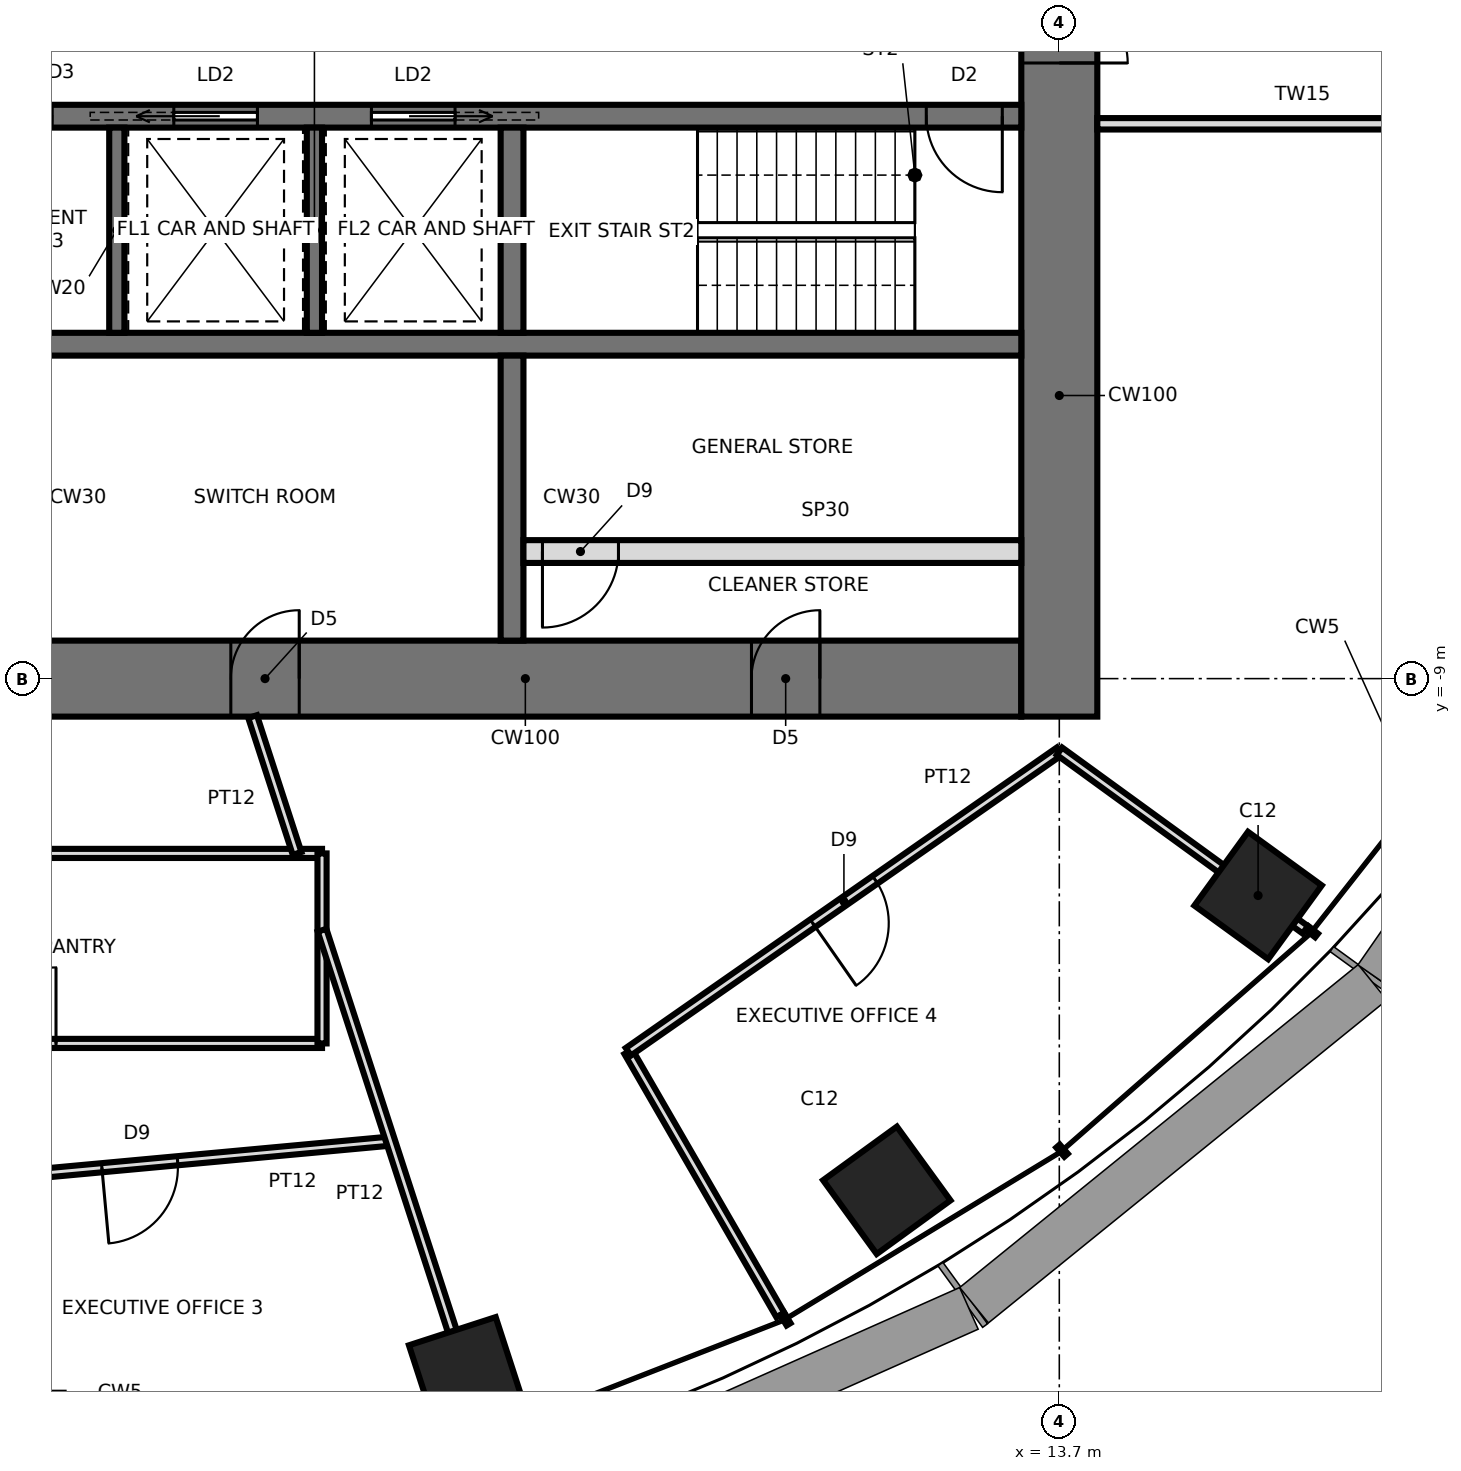
"""IFC4 building model, lengths in metres.
Left out: names, types, materials, properties, quantities, classifications, styles, units other than length and angle.
Written with IfcOpenShell. Run it as: python <this file> out.ifc"""

import sys

from ifc_helpers import new_model, si_unit, direction, frame, frame_2d, origin, origin_2d, place, context, subcontext, project, spatial, rectangle, extrude, element, fill, save


model = new_model("IFC4")
c1 = context("Model", 3, precision=1e-05, world=origin(), true_north=direction((0.0, 1.0)))
c2 = subcontext(c1, "Body", "Model", "MODEL_VIEW")
j1 = project(units=[si_unit("LENGTHUNIT", "METRE"), si_unit("PLANEANGLEUNIT", "RADIAN")], contexts=[c1])
p1 = place(None, origin())
s1 = spatial("IfcSite", under=j1, at=p1, CompositionType="ELEMENT")
p2 = place(p1, origin())
s2 = spatial("IfcBuilding", under=s1, at=p2, CompositionType="ELEMENT")
p3 = place(p2, frame((0.0, 0.0, 256.0)))
s3 = spatial("IfcBuildingStorey", under=s2, at=p3, CompositionType="ELEMENT", Elevation=256.0)
for number, where, z_axis, x_axis in (
    (1, (5.9, -18.157, 0.0), (0.0, 0.0, 1.0), (0.309, -0.951, 0.0)),
    (2, (11.43, -15.733, 0.0), (0.0, 0.0, 1.0), (0.588, -0.809, 0.0)),
    (3, (16.315, -11.854, 0.0), (0.0, 0.0, 1.0), (0.809, -0.588, 0.0)),
):
    element("IfcColumn", number, at=place(p3, frame(where, z_axis=z_axis, x_axis=x_axis)), inside=s3, PredefinedType="COLUMN", context=c2, shape_type="SweptSolid", body=[
        extrude(rectangle(XDim=1.2, YDim=1.2, at=origin_2d()), origin(), (0.0, 0.0, 1.0), 4.2),
    ])
p4 = place(p3, frame((-13.2, -9.0, 0.0), z_axis=(0.0, 0.0, 1.0), x_axis=(1.0, 0.0, 0.0)))
e4 = element("IfcWall", 4, at=p4, inside=s3, PredefinedType="SHEAR", context=c2, shape_type="SweptSolid", body=[
    extrude(rectangle(XDim=26.4, YDim=1.0, at=frame_2d((13.2, 0.0))), origin(), (0.0, 0.0, 1.0), 4.2),
])
p5 = place(p4, frame((2.65, 0.0, 0.0)))
e5 = element("IfcOpeningElement", 5, at=p5, cuts=e4, PredefinedType="OPENING", context=c2, shape_type="SweptSolid", body=[
    extrude(rectangle(XDim=0.9, YDim=2.1, at=frame_2d((0.45, 1.05))), frame((0.0, 0.51, 0.0), z_axis=(0.0, -1.0, 0.0), x_axis=(1.0, 0.0, 0.0)), (0.0, 0.0, 1.0), 1.02),
])
p6 = place(p4, frame((9.5, 0.0, 0.0)))
e6 = element("IfcOpeningElement", 6, at=p6, cuts=e4, PredefinedType="OPENING", context=c2, shape_type="SweptSolid", body=[
    extrude(rectangle(XDim=0.9, YDim=2.1, at=frame_2d((0.45, 1.05))), frame((0.0, 0.51, 0.0), z_axis=(0.0, -1.0, 0.0), x_axis=(1.0, 0.0, 0.0)), (0.0, 0.0, 1.0), 1.02),
])
p7 = place(p4, frame((16.0, 0.0, 0.0)))
e7 = element("IfcOpeningElement", 7, at=p7, cuts=e4, PredefinedType="OPENING", context=c2, shape_type="SweptSolid", body=[
    extrude(rectangle(XDim=0.9, YDim=2.1, at=frame_2d((0.45, 1.05))), frame((0.0, 0.51, 0.0), z_axis=(0.0, -1.0, 0.0), x_axis=(1.0, 0.0, 0.0)), (0.0, 0.0, 1.0), 1.02),
])
p8 = place(p4, frame((22.85, 0.0, 0.0)))
e8 = element("IfcOpeningElement", 8, at=p8, cuts=e4, PredefinedType="OPENING", context=c2, shape_type="SweptSolid", body=[
    extrude(rectangle(XDim=0.9, YDim=2.1, at=frame_2d((0.45, 1.05))), frame((0.0, 0.51, 0.0), z_axis=(0.0, -1.0, 0.0), x_axis=(1.0, 0.0, 0.0)), (0.0, 0.0, 1.0), 1.02),
])
p9 = place(p3, frame((13.7, -9.5, 0.0), z_axis=(0.0, 0.0, 1.0), x_axis=(0.0, 1.0, 0.0)))
e9 = element("IfcWall", 9, at=p9, inside=s3, PredefinedType="SHEAR", context=c2, shape_type="SweptSolid", body=[
    extrude(rectangle(XDim=19.0, YDim=1.0, at=frame_2d((9.5, 0.0))), origin(), (0.0, 0.0, 1.0), 4.2),
])
p10 = place(p9, frame((8.6, 0.0, 0.0)))
e10 = element("IfcOpeningElement", 10, at=p10, cuts=e9, PredefinedType="OPENING", context=c2, shape_type="SweptSolid", body=[
    extrude(rectangle(XDim=1.8, YDim=2.4, at=frame_2d((0.9, 1.2))), frame((0.0, 0.51, 0.0), z_axis=(0.0, -1.0, 0.0), x_axis=(1.0, 0.0, 0.0)), (0.0, 0.0, 1.0), 1.02),
])
p11 = place(p3, frame((-13.2, -1.6, 0.0), z_axis=(0.0, 0.0, 1.0), x_axis=(1.0, 0.0, 0.0)))
e11 = element("IfcWall", 11, at=p11, inside=s3, PredefinedType="SHEAR", context=c2, shape_type="SweptSolid", body=[
    extrude(rectangle(XDim=26.4, YDim=0.3, at=frame_2d((13.2, 0.0))), origin(), (0.0, 0.0, 1.0), 4.2),
])
p12 = place(p11, frame((25.15, 0.0, 0.0)))
e12 = element("IfcOpeningElement", 12, at=p12, cuts=e11, PredefinedType="OPENING", context=c2, shape_type="SweptSolid", body=[
    extrude(rectangle(XDim=1.0, YDim=2.1, at=frame_2d((0.5, 1.05))), frame((0.0, 0.16, 0.0), z_axis=(0.0, -1.0, 0.0), x_axis=(1.0, 0.0, 0.0)), (0.0, 0.0, 1.0), 0.32),
])
p13 = place(p11, frame((7.55, 0.0, 0.0)))
e13 = element("IfcOpeningElement", 13, at=p13, cuts=e11, PredefinedType="OPENING", context=c2, shape_type="SweptSolid", body=[
    extrude(rectangle(XDim=0.9, YDim=2.1, at=frame_2d((0.45, 1.05))), frame((0.0, 0.16, 0.0), z_axis=(0.0, -1.0, 0.0), x_axis=(1.0, 0.0, 0.0)), (0.0, 0.0, 1.0), 0.32),
])
p14 = place(p11, frame((10.15, 0.0, 0.0)))
e14 = element("IfcOpeningElement", 14, at=p14, cuts=e11, PredefinedType="OPENING", context=c2, shape_type="SweptSolid", body=[
    extrude(rectangle(XDim=0.9, YDim=2.1, at=frame_2d((0.45, 1.05))), frame((0.0, 0.16, 0.0), z_axis=(0.0, -1.0, 0.0), x_axis=(1.0, 0.0, 0.0)), (0.0, 0.0, 1.0), 0.32),
])
p15 = place(p11, frame((12.75, 0.0, 0.0)))
e15 = element("IfcOpeningElement", 15, at=p15, cuts=e11, PredefinedType="OPENING", context=c2, shape_type="SweptSolid", body=[
    extrude(rectangle(XDim=0.9, YDim=2.1, at=frame_2d((0.45, 1.05))), frame((0.0, 0.16, 0.0), z_axis=(0.0, -1.0, 0.0), x_axis=(1.0, 0.0, 0.0)), (0.0, 0.0, 1.0), 0.32),
])
p16 = place(p11, frame((15.25, 0.0, 0.0)))
e16 = element("IfcOpeningElement", 16, at=p16, cuts=e11, PredefinedType="OPENING", context=c2, shape_type="SweptSolid", body=[
    extrude(rectangle(XDim=1.1, YDim=2.3, at=frame_2d((0.55, 1.15))), frame((0.0, 0.16, 0.0), z_axis=(0.0, -1.0, 0.0), x_axis=(1.0, 0.0, 0.0)), (0.0, 0.0, 1.0), 0.32),
])
p17 = place(p11, frame((17.85, 0.0, 0.0)))
e17 = element("IfcOpeningElement", 17, at=p17, cuts=e11, PredefinedType="OPENING", context=c2, shape_type="SweptSolid", body=[
    extrude(rectangle(XDim=1.1, YDim=2.3, at=frame_2d((0.55, 1.15))), frame((0.0, 0.16, 0.0), z_axis=(0.0, -1.0, 0.0), x_axis=(1.0, 0.0, 0.0)), (0.0, 0.0, 1.0), 0.32),
])
p18 = place(p11, frame((5.55, 0.0, 0.0)))
e18 = element("IfcOpeningElement", 18, at=p18, cuts=e11, PredefinedType="OPENING", context=c2, shape_type="SweptSolid", body=[
    extrude(rectangle(XDim=0.9, YDim=2.1, at=frame_2d((0.45, 1.05))), frame((0.0, 0.16, 0.0), z_axis=(0.0, -1.0, 0.0), x_axis=(1.0, 0.0, 0.0)), (0.0, 0.0, 1.0), 0.32),
])
p19 = place(p3, frame((-13.2, -4.6, 0.0), z_axis=(0.0, 0.0, 1.0), x_axis=(1.0, 0.0, 0.0)))
e19 = element("IfcWall", 19, at=p19, inside=s3, PredefinedType="SHEAR", context=c2, shape_type="SweptSolid", body=[
    extrude(rectangle(XDim=26.4, YDim=0.3, at=frame_2d((13.2, 0.0))), origin(), (0.0, 0.0, 1.0), 4.2),
])
p20 = place(p3, frame((6.5, -1.75, 0.0), z_axis=(0.0, 0.0, 1.0), x_axis=(0.0, -1.0, 0.0)))
e20 = element("IfcWall", 20, at=p20, inside=s3, PredefinedType="SHEAR", context=c2, shape_type="SweptSolid", body=[
    extrude(rectangle(XDim=2.7, YDim=0.3, at=frame_2d((1.35, 0.0))), origin(), (0.0, 0.0, 1.0), 4.2),
])
p21 = place(p3, frame((6.5, -4.75, 0.0), z_axis=(0.0, 0.0, 1.0), x_axis=(0.0, -1.0, 0.0)))
e21 = element("IfcWall", 21, at=p21, inside=s3, PredefinedType="SHEAR", context=c2, shape_type="SweptSolid", body=[
    extrude(rectangle(XDim=3.75, YDim=0.3, at=frame_2d((1.875, 0.0))), origin(), (0.0, 0.0, 1.0), 4.2),
])
for number, where, z_axis, x_axis in (
    (22, (1.3, -1.75, 0.0), (0.0, 0.0, 1.0), (0.0, -1.0, 0.0)),
    (23, (3.9, -1.75, 0.0), (0.0, 0.0, 1.0), (0.0, -1.0, 0.0)),
):
    element("IfcWall", number, at=place(p3, frame(where, z_axis=z_axis, x_axis=x_axis)), inside=s3, PredefinedType="SHEAR", context=c2, shape_type="SweptSolid", body=[
        extrude(rectangle(XDim=2.7, YDim=0.2, at=frame_2d((1.35, 0.0))), origin(), (0.0, 0.0, 1.0), 4.2),
    ])
p22 = place(p3, frame((6.65, -7.328, 0.0), z_axis=(0.0, 0.0, 1.0), x_axis=(1.0, 0.0, 0.0)))
e24 = element("IfcWall", 24, at=p22, inside=s3, PredefinedType="PARTITIONING", context=c2, shape_type="SweptSolid", body=[
    extrude(rectangle(XDim=6.55, YDim=0.3, at=frame_2d((3.275, 0.0))), origin(), (0.0, 0.0, 1.0), 4.04),
])
p23 = place(p22, frame((0.25, 0.0, 0.0)))
e25 = element("IfcOpeningElement", 25, at=p23, cuts=e24, PredefinedType="OPENING", context=c2, shape_type="SweptSolid", body=[
    extrude(rectangle(XDim=1.0, YDim=2.4, at=frame_2d((0.5, 1.2))), frame((0.0, 0.16, 0.0), z_axis=(0.0, -1.0, 0.0), x_axis=(1.0, 0.0, 0.0)), (0.0, 0.0, 1.0), 0.32),
])
p24 = place(p3, frame((-4.0, -13.8, 0.0), z_axis=(0.0, 0.0, 1.0), x_axis=(1.0, 0.0, 0.0)))
e26 = element("IfcWall", 26, at=p24, inside=s3, PredefinedType="PARTITIONING", context=c2, shape_type="SweptSolid", body=[
    extrude(rectangle(XDim=8.0, YDim=0.12, at=frame_2d((4.0, 0.0))), origin(), (0.0, 0.0, 1.0), 4.04),
])
p25 = place(p24, frame((3.5, 0.0, 0.0)))
e27 = element("IfcOpeningElement", 27, at=p25, cuts=e26, PredefinedType="OPENING", context=c2, shape_type="SweptSolid", body=[
    extrude(rectangle(XDim=1.0, YDim=2.4, at=frame_2d((0.5, 1.2))), frame((0.0, 0.07, 0.0), z_axis=(0.0, -1.0, 0.0), x_axis=(1.0, 0.0, 0.0)), (0.0, 0.0, 1.0), 0.14),
])
p26 = place(p3, frame((4.0, -11.3, 0.0), z_axis=(0.0, 0.0, 1.0), x_axis=(-1.0, 0.0, 0.0)))
e28 = element("IfcWall", 28, at=p26, inside=s3, PredefinedType="PARTITIONING", context=c2, shape_type="SweptSolid", body=[
    extrude(rectangle(XDim=8.0, YDim=0.12, at=frame_2d((4.0, 0.0))), origin(), (0.0, 0.0, 1.0), 4.04),
])
p27 = place(p3, frame((4.901, -15.085, 0.0), z_axis=(0.0, 0.0, 1.0), x_axis=(-0.995772164665, -0.091857476986, 0.0)))
e29 = element("IfcWall", 29, at=p27, inside=s3, PredefinedType="PARTITIONING", context=c2, shape_type="SweptSolid", body=[
    extrude(rectangle(XDim=6.578, YDim=0.12, at=frame_2d((3.289, 0.0))), origin(), (0.0, 0.0, 1.0), 3.637),
])
p28 = place(p27, frame((2.814, 0.0, 0.0)))
e30 = element("IfcOpeningElement", 30, at=p28, cuts=e29, PredefinedType="OPENING", context=c2, shape_type="SweptSolid", body=[
    extrude(rectangle(XDim=1.0, YDim=2.4, at=frame_2d((0.5, 1.2))), frame((0.0, 0.07, 0.0), z_axis=(0.0, -1.0, 0.0), x_axis=(1.0, 0.0, 0.0)), (0.0, 0.0, 1.0), 0.14),
])
p29 = place(p3, frame((4.0, -13.8, 0.0), z_axis=(0.0, 0.0, 1.0), x_axis=(0.0, 1.0, 0.0)))
e31 = element("IfcWall", 31, at=p29, inside=s3, PredefinedType="PARTITIONING", context=c2, shape_type="SweptSolid", body=[
    extrude(rectangle(XDim=2.5, YDim=0.12, at=frame_2d((1.25, 0.0))), origin(), (0.0, 0.0, 1.0), 4.04),
])
p30 = place(p3, frame((6.137, -18.889, 0.0), z_axis=(0.0, 0.0, 1.0), x_axis=(-0.309007859613, 0.951059484311, 0.0)))
e32 = element("IfcWall", 32, at=p30, inside=s3, PredefinedType="PARTITIONING", context=c2, shape_type="SweptSolid", body=[
    extrude(rectangle(XDim=6.917, YDim=0.12, at=frame_2d((3.458, 0.0))), origin(), (0.0, 0.0, 1.0), 3.24),
])
p31 = place(p3, frame((3.672, -11.3, 0.0), z_axis=(0.0, 0.0, 1.0), x_axis=(-0.309059822154, 0.95104259964, 0.0)))
e33 = element("IfcWall", 33, at=p31, inside=s3, PredefinedType="PARTITIONING", context=c2, shape_type="SweptSolid", body=[
    extrude(rectangle(XDim=1.893, YDim=0.12, at=frame_2d((0.946, 0.0))), origin(), (0.0, 0.0, 1.0), 3.24),
])
p32 = place(p3, frame((8.031, -13.909, 0.0), z_axis=(0.0, 0.0, 1.0), x_axis=(0.49999894854, -0.866026010844, 0.0)))
e34 = element("IfcWall", 34, at=p32, inside=s3, PredefinedType="PARTITIONING", context=c2, shape_type="SweptSolid", body=[
    extrude(rectangle(XDim=4.0, YDim=0.12, at=frame_2d((2.0, 0.0))), origin(), (0.0, 0.0, 1.0), 4.04),
])
p33 = place(p3, frame((13.702, -9.955, 0.0), z_axis=(0.0, 0.0, 1.0), x_axis=(-0.820320356129, -0.571904286852, 0.0)))
e35 = element("IfcWall", 35, at=p33, inside=s3, PredefinedType="PARTITIONING", context=c2, shape_type="SweptSolid", body=[
    extrude(rectangle(XDim=6.914, YDim=0.12, at=frame_2d((3.457, 0.0))), origin(), (0.0, 0.0, 1.0), 4.04),
])
p34 = place(p33, frame((2.957, 0.0, 0.0)))
e36 = element("IfcOpeningElement", 36, at=p34, cuts=e35, PredefinedType="OPENING", context=c2, shape_type="SweptSolid", body=[
    extrude(rectangle(XDim=1.0, YDim=2.4, at=frame_2d((0.5, 1.2))), frame((0.0, 0.07, 0.0), z_axis=(0.0, -1.0, 0.0), x_axis=(1.0, 0.0, 0.0)), (0.0, 0.0, 1.0), 0.14),
])
p35 = place(p3, frame((16.938, -12.306, 0.0), z_axis=(0.0, 0.0, 1.0), x_axis=(-0.809026317077, 0.587772420479, 0.0)))
e37 = element("IfcWall", 37, at=p35, inside=s3, PredefinedType="PARTITIONING", context=c2, shape_type="SweptSolid", body=[
    extrude(rectangle(XDim=4.0, YDim=0.12, at=frame_2d((2.0, 0.0))), origin(), (0.0, 0.0, 1.0), 3.24),
])
p36 = place(p3, frame((14.2, -1.7, 0.0), z_axis=(0.0, 0.0, 1.0), x_axis=(1.0, 0.0, 0.0)))
e38 = element("IfcWall", 38, at=p36, inside=s3, PredefinedType="PARTITIONING", context=c2, shape_type="SweptSolid", body=[
    extrude(rectangle(XDim=5.4, YDim=0.15, at=frame_2d((2.7, 0.0))), origin(), (0.0, 0.0, 1.0), 4.04),
])
p37 = place(p10, frame((1.8, 0.0, 0.0), z_axis=(0.0, 0.0, 1.0), x_axis=(-1.0, 0.0, 0.0)))
e39 = element("IfcDoor", 39, at=p37, inside=s3, OperationType="DOUBLE_DOOR_SINGLE_SWING", PredefinedType="DOOR", context=c2, shape_type="SweptSolid", body=[
    extrude(rectangle(XDim=1.72, YDim=2.36, at=frame_2d((0.9, 1.18))), frame((0.0, 0.025, 0.0), z_axis=(0.0, -1.0, 0.0), x_axis=(1.0, 0.0, 0.0)), (0.0, 0.0, 1.0), 0.05),
    extrude(rectangle(XDim=0.04, YDim=2.4, at=frame_2d((1.78, 1.2))), frame((0.0, 0.25, 0.0), z_axis=(0.0, -1.0, 0.0), x_axis=(1.0, 0.0, 0.0)), (0.0, 0.0, 1.0), 0.5),
    extrude(rectangle(XDim=0.04, YDim=2.4, at=frame_2d((0.02, 1.2))), frame((0.0, 0.25, 0.0), z_axis=(0.0, -1.0, 0.0), x_axis=(1.0, 0.0, 0.0)), (0.0, 0.0, 1.0), 0.5),
    extrude(rectangle(XDim=1.72, YDim=0.04, at=frame_2d((0.9, 2.38))), frame((0.0, 0.25, 0.0), z_axis=(0.0, -1.0, 0.0), x_axis=(1.0, 0.0, 0.0)), (0.0, 0.0, 1.0), 0.5),
])
fill(e10, e39)
p38 = place(p12, frame((1.0, 0.0, 0.0), z_axis=(0.0, 0.0, 1.0), x_axis=(-1.0, 0.0, 0.0)))
e40 = element("IfcDoor", 40, at=p38, inside=s3, OperationType="SINGLE_SWING_LEFT", PredefinedType="DOOR", context=c2, shape_type="SweptSolid", body=[
    extrude(rectangle(XDim=1.0, YDim=2.1, at=frame_2d((0.5, 1.05))), frame((0.0, 0.025, 0.0), z_axis=(0.0, -1.0, 0.0), x_axis=(1.0, 0.0, 0.0)), (0.0, 0.0, 1.0), 0.05),
])
fill(e12, e40)
p39 = place(p16, frame((1.1, 0.0, 0.0), z_axis=(0.0, 0.0, 1.0), x_axis=(-1.0, 0.0, 0.0)))
e41 = element("IfcDoor", 41, at=p39, inside=s3, OperationType="SLIDING_TO_RIGHT", PredefinedType="DOOR", context=c2, shape_type="SweptSolid", body=[
    extrude(rectangle(XDim=1.1, YDim=2.3, at=frame_2d((0.55, 1.15))), frame((0.0, 0.025, 0.0), z_axis=(0.0, -1.0, 0.0), x_axis=(1.0, 0.0, 0.0)), (0.0, 0.0, 1.0), 0.05),
])
fill(e16, e41)
p40 = place(p17, frame((1.1, 0.0, 0.0), z_axis=(0.0, 0.0, 1.0), x_axis=(-1.0, 0.0, 0.0)))
e42 = element("IfcDoor", 42, at=p40, inside=s3, OperationType="SLIDING_TO_LEFT", PredefinedType="DOOR", context=c2, shape_type="SweptSolid", body=[
    extrude(rectangle(XDim=1.1, YDim=2.3, at=frame_2d((0.55, 1.15))), frame((0.0, 0.025, 0.0), z_axis=(0.0, -1.0, 0.0), x_axis=(1.0, 0.0, 0.0)), (0.0, 0.0, 1.0), 0.05),
])
fill(e17, e42)
p41 = place(p7, origin())
e43 = element("IfcDoor", 43, at=p41, inside=s3, OperationType="SINGLE_SWING_RIGHT", PredefinedType="DOOR", context=c2, shape_type="SweptSolid", body=[
    extrude(rectangle(XDim=0.82, YDim=2.06, at=frame_2d((0.45, 1.03))), frame((0.0, 0.025, 0.0), z_axis=(0.0, -1.0, 0.0), x_axis=(1.0, 0.0, 0.0)), (0.0, 0.0, 1.0), 0.05),
    extrude(rectangle(XDim=0.04, YDim=2.1, at=frame_2d((0.02, 1.05))), frame((0.0, 0.25, 0.0), z_axis=(0.0, -1.0, 0.0), x_axis=(1.0, 0.0, 0.0)), (0.0, 0.0, 1.0), 0.5),
    extrude(rectangle(XDim=0.04, YDim=2.1, at=frame_2d((0.88, 1.05))), frame((0.0, 0.25, 0.0), z_axis=(0.0, -1.0, 0.0), x_axis=(1.0, 0.0, 0.0)), (0.0, 0.0, 1.0), 0.5),
    extrude(rectangle(XDim=0.82, YDim=0.04, at=frame_2d((0.45, 2.08))), frame((0.0, 0.25, 0.0), z_axis=(0.0, -1.0, 0.0), x_axis=(1.0, 0.0, 0.0)), (0.0, 0.0, 1.0), 0.5),
])
fill(e7, e43)
p42 = place(p8, origin())
e44 = element("IfcDoor", 44, at=p42, inside=s3, OperationType="SINGLE_SWING_RIGHT", PredefinedType="DOOR", context=c2, shape_type="SweptSolid", body=[
    extrude(rectangle(XDim=0.82, YDim=2.06, at=frame_2d((0.45, 1.03))), frame((0.0, 0.025, 0.0), z_axis=(0.0, -1.0, 0.0), x_axis=(1.0, 0.0, 0.0)), (0.0, 0.0, 1.0), 0.05),
    extrude(rectangle(XDim=0.04, YDim=2.1, at=frame_2d((0.02, 1.05))), frame((0.0, 0.25, 0.0), z_axis=(0.0, -1.0, 0.0), x_axis=(1.0, 0.0, 0.0)), (0.0, 0.0, 1.0), 0.5),
    extrude(rectangle(XDim=0.04, YDim=2.1, at=frame_2d((0.88, 1.05))), frame((0.0, 0.25, 0.0), z_axis=(0.0, -1.0, 0.0), x_axis=(1.0, 0.0, 0.0)), (0.0, 0.0, 1.0), 0.5),
    extrude(rectangle(XDim=0.82, YDim=0.04, at=frame_2d((0.45, 2.08))), frame((0.0, 0.25, 0.0), z_axis=(0.0, -1.0, 0.0), x_axis=(1.0, 0.0, 0.0)), (0.0, 0.0, 1.0), 0.5),
])
fill(e8, e44)
p43 = place(p23, frame((1.0, 0.0, 0.0), z_axis=(0.0, 0.0, 1.0), x_axis=(-1.0, 0.0, 0.0)))
e45 = element("IfcDoor", 45, at=p43, inside=s3, OperationType="SINGLE_SWING_RIGHT", PredefinedType="DOOR", context=c2, shape_type="SweptSolid", body=[
    extrude(rectangle(XDim=1.0, YDim=2.4, at=frame_2d((0.5, 1.2))), frame((0.0, 0.025, 0.0), z_axis=(0.0, -1.0, 0.0), x_axis=(1.0, 0.0, 0.0)), (0.0, 0.0, 1.0), 0.05),
])
fill(e25, e45)
p44 = place(p28, origin())
e46 = element("IfcDoor", 46, at=p44, inside=s3, OperationType="SINGLE_SWING_RIGHT", PredefinedType="DOOR", context=c2, shape_type="SweptSolid", body=[
    extrude(rectangle(XDim=1.0, YDim=2.4, at=frame_2d((0.5, 1.2))), frame((0.0, 0.025, 0.0), z_axis=(0.0, -1.0, 0.0), x_axis=(1.0, 0.0, 0.0)), (0.0, 0.0, 1.0), 0.05),
])
fill(e30, e46)
p45 = place(p34, origin())
e47 = element("IfcDoor", 47, at=p45, inside=s3, OperationType="SINGLE_SWING_RIGHT", PredefinedType="DOOR", context=c2, shape_type="SweptSolid", body=[
    extrude(rectangle(XDim=1.0, YDim=2.4, at=frame_2d((0.5, 1.2))), frame((0.0, 0.025, 0.0), z_axis=(0.0, -1.0, 0.0), x_axis=(1.0, 0.0, 0.0)), (0.0, 0.0, 1.0), 0.05),
])
fill(e36, e47)
p46 = place(p25, origin())
e48 = element("IfcDoor", 48, at=p46, inside=s3, OperationType="SINGLE_SWING_RIGHT", PredefinedType="DOOR", context=c2, shape_type="SweptSolid", body=[
    extrude(rectangle(XDim=1.0, YDim=2.4, at=frame_2d((0.5, 1.2))), frame((0.0, 0.025, 0.0), z_axis=(0.0, -1.0, 0.0), x_axis=(1.0, 0.0, 0.0)), (0.0, 0.0, 1.0), 0.05),
])
fill(e27, e48)
save(model, sys.argv[1])
